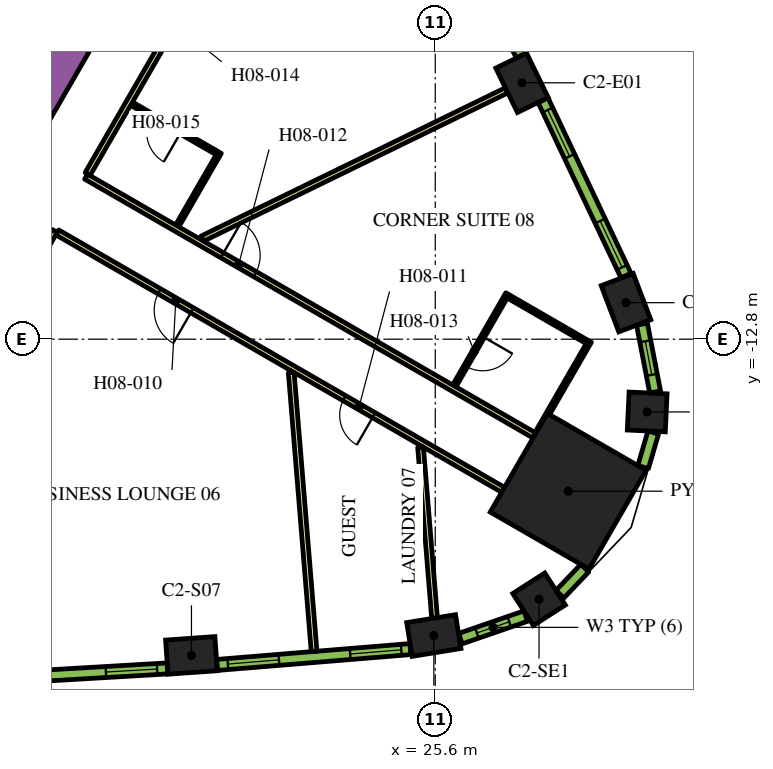
"""IFC4 building model, lengths in metres.
Left out: names, types, materials, properties, quantities, classifications, styles, units other than length and angle.
Written with IfcOpenShell. Run it as: python <this file> out.ifc"""

import sys

from ifc_helpers import new_model, si_unit, direction, frame, frame_2d, origin, origin_2d, place, context, subcontext, project, spatial, rectangle, extrude, element, fill, save


model = new_model("IFC4")
c1 = context("Model", 3, precision=1e-05, world=origin(), true_north=direction((0.0, 1.0)))
c2 = subcontext(c1, "Body", "Model", "MODEL_VIEW")
j1 = project(units=[si_unit("LENGTHUNIT", "METRE"), si_unit("PLANEANGLEUNIT", "RADIAN")], contexts=[c1])
p1 = place(None, origin())
s1 = spatial("IfcSite", under=j1, at=p1, CompositionType="ELEMENT")
p2 = place(p1, origin())
s2 = spatial("IfcBuilding", under=s1, at=p2, CompositionType="ELEMENT")
p3 = place(p2, frame((0.0, 0.0, 111.0)))
s3 = spatial("IfcBuildingStorey", under=s2, at=p3, CompositionType="ELEMENT", Elevation=111.0)
p4 = place(p3, frame((29.097, -16.799, 0.0), z_axis=(0.0, 0.0, 1.0), x_axis=(0.866025403784, -0.5, 0.0)))
e1 = element("IfcColumn", 1, at=p4, inside=s3, PredefinedType="COLUMN", context=c2, shape_type="SweptSolid", body=[
    extrude(rectangle(XDim=3.0, YDim=3.0, at=origin_2d()), origin(), (0.0, 0.0, 1.0), 3.9),
])
for number, where, z_axis, x_axis in (
    (2, (19.184, -21.12, 0.0), (0.0, 0.0, 1.0), (0.998, 0.07, 0.0)),
    (3, (25.563, -20.597, 0.0), (0.0, 0.0, 1.0), (0.987, 0.159, 0.0)),
):
    element("IfcColumn", number, at=place(p3, frame(where, z_axis=z_axis, x_axis=x_axis)), inside=s3, PredefinedType="COLUMN", context=c2, shape_type="SweptSolid", body=[
        extrude(rectangle(XDim=1.3, YDim=0.9, at=origin_2d()), origin(), (0.0, 0.0, 1.0), 3.9),
    ])
for number, where, z_axis, x_axis in (
    (4, (28.331, -19.643, 0.0), (0.0, 0.0, 1.0), (0.842, 0.54, 0.0)),
    (5, (31.177, -14.714, 0.0), (0.0, 0.0, 1.0), (0.047, 0.999, 0.0)),
):
    element("IfcColumn", number, at=place(p3, frame(where, z_axis=z_axis, x_axis=x_axis)), inside=s3, PredefinedType="COLUMN", context=c2, shape_type="SweptSolid", body=[
        extrude(rectangle(XDim=1.0, YDim=1.0, at=origin_2d()), origin(), (0.0, 0.0, 1.0), 3.9),
    ])
for number, where, z_axis, x_axis in (
    (6, (30.619, -11.839, 0.0), (0.0, 0.0, 1.0), (-0.355, 0.935, 0.0)),
    (7, (27.883, -6.054, 0.0), (0.0, 0.0, 1.0), (-0.438, 0.899, 0.0)),
):
    element("IfcColumn", number, at=place(p3, frame(where, z_axis=z_axis, x_axis=x_axis)), inside=s3, PredefinedType="COLUMN", context=c2, shape_type="SweptSolid", body=[
        extrude(rectangle(XDim=1.3, YDim=0.9, at=origin_2d()), origin(), (0.0, 0.0, 1.0), 3.9),
    ])
p5 = place(p3, frame((11.695, -12.644, 0.0), z_axis=(0.0, 0.0, 1.0), x_axis=(0.500010229568, 0.86601949766, 0.0)))
e8 = element("IfcWall", 8, at=p5, inside=s3, PredefinedType="SOLIDWALL", context=c2, shape_type="SweptSolid", body=[
    extrude(rectangle(XDim=9.326, YDim=0.9, at=frame_2d((4.663, 0.0))), origin(), (0.0, 0.0, 1.0), 3.9),
])
p6 = place(p3, frame((16.412, -8.523, 0.0), z_axis=(0.0, 0.0, 1.0), x_axis=(0.866025629663, -0.499999608766, 0.0)))
e9 = element("IfcWall", 9, at=p6, inside=s3, PredefinedType="PARTITIONING", context=c2, shape_type="SweptSolid", body=[
    extrude(rectangle(XDim=13.624, YDim=0.15, at=frame_2d((6.812, 0.0))), origin(), (0.0, 0.0, 1.0), 2.75),
])
p7 = place(p6, frame((4.134, 0.0, 0.0)))
e10 = element("IfcOpeningElement", 10, at=p7, cuts=e9, PredefinedType="OPENING", context=c2, shape_type="SweptSolid", body=[
    extrude(rectangle(XDim=1.0, YDim=2.1, at=frame_2d((0.5, 1.05))), frame((0.0, 0.085, 0.0), z_axis=(0.0, -1.0, 0.0), x_axis=(1.0, 0.0, 0.0)), (0.0, 0.0, 1.0), 0.17),
])
p8 = place(p3, frame((19.081, -3.9, 0.0), z_axis=(0.0, 0.0, 1.0), x_axis=(-0.499974327079, -0.866040225545, 0.0)))
e11 = element("IfcWall", 11, at=p8, inside=s3, PredefinedType="PARTITIONING", context=c2, shape_type="SweptSolid", body=[
    extrude(rectangle(XDim=5.258, YDim=0.15, at=frame_2d((2.629, 0.0))), origin(), (0.0, 0.0, 1.0), 2.75),
])
p9 = place(p8, frame((0.18, 0.0, 0.0)))
e12 = element("IfcOpeningElement", 12, at=p9, cuts=e11, PredefinedType="OPENING", context=c2, shape_type="SweptSolid", body=[
    extrude(rectangle(XDim=1.0, YDim=2.1, at=frame_2d((0.5, 1.05))), frame((0.0, 0.085, 0.0), z_axis=(0.0, -1.0, 0.0), x_axis=(1.0, 0.0, 0.0)), (0.0, 0.0, 1.0), 0.17),
])
p10 = place(p3, frame((15.587, -9.952, 0.0), z_axis=(0.0, 0.0, 1.0), x_axis=(-0.500016618951, -0.866015808616, 0.0)))
e13 = element("IfcWall", 13, at=p10, inside=s3, PredefinedType="PARTITIONING", context=c2, shape_type="SweptSolid", body=[
    extrude(rectangle(XDim=5.268, YDim=0.15, at=frame_2d((2.634, 0.0))), origin(), (0.0, 0.0, 1.0), 2.75),
])
p11 = place(p3, frame((27.386, -16.764, 0.0), z_axis=(0.0, 0.0, 1.0), x_axis=(-0.866022585856, 0.500004880763, 0.0)))
e14 = element("IfcWall", 14, at=p11, inside=s3, PredefinedType="PARTITIONING", context=c2, shape_type="SweptSolid", body=[
    extrude(rectangle(XDim=13.544, YDim=0.15, at=frame_2d((6.772, 0.0))), origin(), (0.0, 0.0, 1.0), 2.75),
])
p12 = place(p11, frame((9.447, 0.0, 0.0)))
e15 = element("IfcOpeningElement", 15, at=p12, cuts=e14, PredefinedType="OPENING", context=c2, shape_type="SweptSolid", body=[
    extrude(rectangle(XDim=1.0, YDim=2.1, at=frame_2d((0.5, 1.05))), frame((0.0, 0.085, 0.0), z_axis=(0.0, -1.0, 0.0), x_axis=(1.0, 0.0, 0.0)), (0.0, 0.0, 1.0), 0.17),
])
p13 = place(p11, frame((3.926, 0.0, 0.0)))
e16 = element("IfcOpeningElement", 16, at=p13, cuts=e14, PredefinedType="OPENING", context=c2, shape_type="SweptSolid", body=[
    extrude(rectangle(XDim=0.9, YDim=2.1, at=frame_2d((0.45, 1.05))), frame((0.0, 0.085, 0.0), z_axis=(0.0, -1.0, 0.0), x_axis=(1.0, 0.0, 0.0)), (0.0, 0.0, 1.0), 0.17),
])
p14 = place(p3, frame((27.478, -6.251, 0.0), z_axis=(0.0, 0.0, 1.0), x_axis=(-0.898940618603, -0.438070501432, 0.0)))
e17 = element("IfcWall", 17, at=p14, inside=s3, PredefinedType="PARTITIONING", context=c2, shape_type="SweptSolid", body=[
    extrude(rectangle(XDim=8.909, YDim=0.15, at=frame_2d((4.455, 0.0))), origin(), (0.0, 0.0, 1.0), 2.75),
])
p15 = place(p3, frame((22.412, -21.016, 0.0), z_axis=(0.0, 0.0, 1.0), x_axis=(-0.081744540534, 0.996653314896, 0.0)))
e18 = element("IfcWall", 18, at=p15, inside=s3, PredefinedType="PARTITIONING", context=c2, shape_type="SweptSolid", body=[
    extrude(rectangle(XDim=7.362, YDim=0.15, at=frame_2d((3.681, 0.0))), origin(), (0.0, 0.0, 1.0), 2.75),
])
p16 = place(p3, frame((25.582, -20.138, 0.0), z_axis=(0.0, 0.0, 1.0), x_axis=(-0.081746132986, 0.996653184283, 0.0)))
e19 = element("IfcWall", 19, at=p16, inside=s3, PredefinedType="PARTITIONING", context=c2, shape_type="SweptSolid", body=[
    extrude(rectangle(XDim=4.51, YDim=0.15, at=frame_2d((2.255, 0.0))), origin(), (0.0, 0.0, 1.0), 2.75),
])
p17 = place(p3, frame((27.5, -11.605, 0.0), z_axis=(0.0, 0.0, 1.0), x_axis=(-0.500049511043, -0.865996816683, 0.0)))
e20 = element("IfcWall", 20, at=p17, inside=s3, PredefinedType="PARTITIONING", context=c2, shape_type="SweptSolid", body=[
    extrude(rectangle(XDim=2.8, YDim=0.1, at=frame_2d((1.4, 0.0))), origin(), (0.0, 0.0, 1.0), 2.75),
])
p18 = place(p17, frame((1.3, 0.0, 0.0)))
e21 = element("IfcOpeningElement", 21, at=p18, cuts=e20, PredefinedType="OPENING", context=c2, shape_type="SweptSolid", body=[
    extrude(rectangle(XDim=0.9, YDim=2.1, at=frame_2d((0.45, 1.05))), frame((0.0, 0.06, 0.0), z_axis=(0.0, -1.0, 0.0), x_axis=(1.0, 0.0, 0.0)), (0.0, 0.0, 1.0), 0.12),
])
p19 = place(p3, frame((27.519, -11.673, 0.0), z_axis=(0.0, 0.0, 1.0), x_axis=(0.866024647952, -0.500001309137, 0.0)))
e22 = element("IfcWall", 22, at=p19, inside=s3, PredefinedType="PARTITIONING", context=c2, shape_type="SweptSolid", body=[
    extrude(rectangle(XDim=2.4, YDim=0.1, at=frame_2d((1.2, 0.0))), origin(), (0.0, 0.0, 1.0), 2.75),
])
p20 = place(p3, frame((28.265, -15.28, 0.0), z_axis=(0.0, 0.0, 1.0), x_axis=(0.500049511043, 0.865996816683, 0.0)))
e23 = element("IfcWall", 23, at=p20, inside=s3, PredefinedType="PARTITIONING", context=c2, shape_type="SweptSolid", body=[
    extrude(rectangle(XDim=2.8, YDim=0.1, at=frame_2d((1.4, 0.0))), origin(), (0.0, 0.0, 1.0), 2.75),
])
p21 = place(p3, frame((19.946, -7.953, 0.0), z_axis=(0.0, 0.0, 1.0), x_axis=(-0.86599734893, 0.500048589285, 0.0)))
e24 = element("IfcWall", 24, at=p21, inside=s3, PredefinedType="PARTITIONING", context=c2, shape_type="SweptSolid", body=[
    extrude(rectangle(XDim=2.7, YDim=0.1, at=frame_2d((1.35, 0.0))), origin(), (0.0, 0.0, 1.0), 2.75),
])
p22 = place(p21, frame((1.2, 0.0, 0.0)))
e25 = element("IfcOpeningElement", 25, at=p22, cuts=e24, PredefinedType="OPENING", context=c2, shape_type="SweptSolid", body=[
    extrude(rectangle(XDim=0.9, YDim=2.1, at=frame_2d((0.45, 1.05))), frame((0.0, 0.06, 0.0), z_axis=(0.0, -1.0, 0.0), x_axis=(1.0, 0.0, 0.0)), (0.0, 0.0, 1.0), 0.12),
])
p23 = place(p3, frame((19.877, -7.972, 0.0), z_axis=(0.0, 0.0, 1.0), x_axis=(-0.500010206181, -0.866019511163, 0.0)))
e26 = element("IfcWall", 26, at=p23, inside=s3, PredefinedType="PARTITIONING", context=c2, shape_type="SweptSolid", body=[
    extrude(rectangle(XDim=2.13, YDim=0.1, at=frame_2d((1.065, 0.0))), origin(), (0.0, 0.0, 1.0), 2.75),
])
p24 = place(p3, frame((13.462, -21.761, 0.0), z_axis=(0.0, 0.0, 1.0), x_axis=(0.998290511436, 0.058447025388, 0.0)))
e27 = element("IfcWall", 27, at=p24, inside=s3, PredefinedType="SOLIDWALL", context=c2, shape_type="SweptSolid", body=[
    extrude(rectangle(XDim=5.1, YDim=0.29, at=frame_2d((2.55, 0.0))), origin(), (0.0, 0.0, 1.0), 3.65),
])
p25 = place(p24, frame((0.272, 0.0, 0.9)))
e28 = element("IfcOpeningElement", 28, at=p25, cuts=e27, PredefinedType="OPENING", context=c2, shape_type="SweptSolid", body=[
    extrude(rectangle(XDim=1.35, YDim=2.15, at=frame_2d((0.675, 1.075))), frame((0.0, 0.155, 0.0), z_axis=(0.0, -1.0, 0.0), x_axis=(1.0, 0.0, 0.0)), (0.0, 0.0, 1.0), 0.31),
])
p26 = place(p24, frame((3.478, 0.0, 0.9)))
e29 = element("IfcOpeningElement", 29, at=p26, cuts=e27, PredefinedType="OPENING", context=c2, shape_type="SweptSolid", body=[
    extrude(rectangle(XDim=1.35, YDim=2.15, at=frame_2d((0.675, 1.075))), frame((0.0, 0.155, 0.0), z_axis=(0.0, -1.0, 0.0), x_axis=(1.0, 0.0, 0.0)), (0.0, 0.0, 1.0), 0.31),
])
p27 = place(p3, frame((19.857, -21.371, 0.0), z_axis=(0.0, 0.0, 1.0), x_axis=(0.99665273362, 0.081751627308, 0.0)))
e30 = element("IfcWall", 30, at=p27, inside=s3, PredefinedType="SOLIDWALL", context=c2, shape_type="SweptSolid", body=[
    extrude(rectangle(XDim=5.107, YDim=0.29, at=frame_2d((2.553, 0.0))), origin(), (0.0, 0.0, 1.0), 3.65),
])
p28 = place(p27, frame((0.285, 0.0, 0.9)))
e31 = element("IfcOpeningElement", 31, at=p28, cuts=e30, PredefinedType="OPENING", context=c2, shape_type="SweptSolid", body=[
    extrude(rectangle(XDim=1.35, YDim=2.15, at=frame_2d((0.675, 1.075))), frame((0.0, 0.155, 0.0), z_axis=(0.0, -1.0, 0.0), x_axis=(1.0, 0.0, 0.0)), (0.0, 0.0, 1.0), 0.31),
])
p29 = place(p27, frame((3.516, 0.0, 0.9)))
e32 = element("IfcOpeningElement", 32, at=p29, cuts=e30, PredefinedType="OPENING", context=c2, shape_type="SweptSolid", body=[
    extrude(rectangle(XDim=1.35, YDim=2.15, at=frame_2d((0.675, 1.075))), frame((0.0, 0.155, 0.0), z_axis=(0.0, -1.0, 0.0), x_axis=(1.0, 0.0, 0.0)), (0.0, 0.0, 1.0), 0.31),
])
p30 = place(p3, frame((26.261, -20.679, 0.0), z_axis=(0.0, 0.0, 1.0), x_axis=(0.945385815453, 0.325953462844, 0.0)))
e33 = element("IfcWall", 33, at=p30, inside=s3, PredefinedType="SOLIDWALL", context=c2, shape_type="SweptSolid", body=[
    extrude(rectangle(XDim=1.819, YDim=0.29, at=frame_2d((0.91, 0.0))), origin(), (0.0, 0.0, 1.0), 3.65),
])
p31 = place(p30, frame((0.46, 0.0, 0.9)))
e34 = element("IfcOpeningElement", 34, at=p31, cuts=e33, PredefinedType="OPENING", context=c2, shape_type="SweptSolid", body=[
    extrude(rectangle(XDim=0.9, YDim=2.15, at=frame_2d((0.45, 1.075))), frame((0.0, 0.155, 0.0), z_axis=(0.0, -1.0, 0.0), x_axis=(1.0, 0.0, 0.0)), (0.0, 0.0, 1.0), 0.31),
])
p32 = place(p3, frame((28.88, -19.509, 0.0), z_axis=(0.0, 0.0, 1.0), x_axis=(0.690414427296, 0.723414071319, 0.0)))
e35 = element("IfcWall", 35, at=p32, inside=s3, PredefinedType="SOLIDWALL", context=c2, shape_type="SweptSolid", body=[
    extrude(rectangle(XDim=0.947, YDim=0.29, at=frame_2d((0.474, 0.0))), origin(), (0.0, 0.0, 1.0), 3.65),
])
p33 = place(p3, frame((31.069, -16.165, 0.0), z_axis=(0.0, 0.0, 1.0), x_axis=(0.281454582132, 0.95957455062, 0.0)))
e36 = element("IfcWall", 36, at=p33, inside=s3, PredefinedType="SOLIDWALL", context=c2, shape_type="SweptSolid", body=[
    extrude(rectangle(XDim=0.947, YDim=0.29, at=frame_2d((0.474, 0.0))), origin(), (0.0, 0.0, 1.0), 3.65),
])
p34 = place(p3, frame((31.385, -14.189, 0.0), z_axis=(0.0, 0.0, 1.0), x_axis=(-0.190409913989, 0.981704672829, 0.0)))
e37 = element("IfcWall", 37, at=p34, inside=s3, PredefinedType="SOLIDWALL", context=c2, shape_type="SweptSolid", body=[
    extrude(rectangle(XDim=1.819, YDim=0.29, at=frame_2d((0.91, 0.0))), origin(), (0.0, 0.0, 1.0), 3.65),
])
p35 = place(p34, frame((0.46, 0.0, 0.9)))
e38 = element("IfcOpeningElement", 38, at=p35, cuts=e37, PredefinedType="OPENING", context=c2, shape_type="SweptSolid", body=[
    extrude(rectangle(XDim=0.9, YDim=2.15, at=frame_2d((0.45, 1.075))), frame((0.0, 0.155, 0.0), z_axis=(0.0, -1.0, 0.0), x_axis=(1.0, 0.0, 0.0)), (0.0, 0.0, 1.0), 0.31),
])
p36 = place(p3, frame((30.62, -11.127, 0.0), z_axis=(0.0, 0.0, 1.0), x_axis=(-0.427543726596, 0.903994669148, 0.0)))
e39 = element("IfcWall", 39, at=p36, inside=s3, PredefinedType="SOLIDWALL", context=c2, shape_type="SweptSolid", body=[
    extrude(rectangle(XDim=5.107, YDim=0.29, at=frame_2d((2.553, 0.0))), origin(), (0.0, 0.0, 1.0), 3.65),
])
p37 = place(p36, frame((0.24, 0.0, 0.9)))
e40 = element("IfcOpeningElement", 40, at=p37, cuts=e39, PredefinedType="OPENING", context=c2, shape_type="SweptSolid", body=[
    extrude(rectangle(XDim=1.35, YDim=2.15, at=frame_2d((0.675, 1.075))), frame((0.0, 0.155, 0.0), z_axis=(0.0, -1.0, 0.0), x_axis=(1.0, 0.0, 0.0)), (0.0, 0.0, 1.0), 0.31),
])
p38 = place(p36, frame((3.471, 0.0, 0.9)))
e41 = element("IfcOpeningElement", 41, at=p38, cuts=e39, PredefinedType="OPENING", context=c2, shape_type="SweptSolid", body=[
    extrude(rectangle(XDim=1.35, YDim=2.15, at=frame_2d((0.675, 1.075))), frame((0.0, 0.155, 0.0), z_axis=(0.0, -1.0, 0.0), x_axis=(1.0, 0.0, 0.0)), (0.0, 0.0, 1.0), 0.31),
])
p39 = place(p3, frame((27.864, -5.336, 0.0), z_axis=(0.0, 0.0, 1.0), x_axis=(-0.448534297211, 0.893765620409, 0.0)))
e42 = element("IfcWall", 42, at=p39, inside=s3, PredefinedType="SOLIDWALL", context=c2, shape_type="SweptSolid", body=[
    extrude(rectangle(XDim=5.1, YDim=0.29, at=frame_2d((2.55, 0.0))), origin(), (0.0, 0.0, 1.0), 3.65),
])
p40 = place(p39, frame((0.272, 0.0, 0.9)))
e43 = element("IfcOpeningElement", 43, at=p40, cuts=e42, PredefinedType="OPENING", context=c2, shape_type="SweptSolid", body=[
    extrude(rectangle(XDim=1.35, YDim=2.15, at=frame_2d((0.675, 1.075))), frame((0.0, 0.155, 0.0), z_axis=(0.0, -1.0, 0.0), x_axis=(1.0, 0.0, 0.0)), (0.0, 0.0, 1.0), 0.31),
])
p41 = place(p39, frame((3.478, 0.0, 0.9)))
e44 = element("IfcOpeningElement", 44, at=p41, cuts=e42, PredefinedType="OPENING", context=c2, shape_type="SweptSolid", body=[
    extrude(rectangle(XDim=1.35, YDim=2.15, at=frame_2d((0.675, 1.075))), frame((0.0, 0.155, 0.0), z_axis=(0.0, -1.0, 0.0), x_axis=(1.0, 0.0, 0.0)), (0.0, 0.0, 1.0), 0.31),
])
p42 = place(p12, origin())
e45 = element("IfcDoor", 45, at=p42, inside=s3, OperationType="SINGLE_SWING_RIGHT", PredefinedType="DOOR", context=c2, shape_type="SweptSolid", body=[
    extrude(rectangle(XDim=1.0, YDim=2.1, at=frame_2d((0.5, 1.05))), frame((0.0, 0.025, 0.0), z_axis=(0.0, -1.0, 0.0), x_axis=(1.0, 0.0, 0.0)), (0.0, 0.0, 1.0), 0.05),
])
fill(e15, e45)
p43 = place(p13, origin())
e46 = element("IfcDoor", 46, at=p43, inside=s3, OperationType="SINGLE_SWING_LEFT", PredefinedType="DOOR", context=c2, shape_type="SweptSolid", body=[
    extrude(rectangle(XDim=0.9, YDim=2.1, at=frame_2d((0.45, 1.05))), frame((0.0, 0.025, 0.0), z_axis=(0.0, -1.0, 0.0), x_axis=(1.0, 0.0, 0.0)), (0.0, 0.0, 1.0), 0.05),
])
fill(e16, e46)
p44 = place(p7, origin())
e47 = element("IfcDoor", 47, at=p44, inside=s3, OperationType="SINGLE_SWING_LEFT", PredefinedType="DOOR", context=c2, shape_type="SweptSolid", body=[
    extrude(rectangle(XDim=1.0, YDim=2.1, at=frame_2d((0.5, 1.05))), frame((0.0, 0.025, 0.0), z_axis=(0.0, -1.0, 0.0), x_axis=(1.0, 0.0, 0.0)), (0.0, 0.0, 1.0), 0.05),
])
fill(e10, e47)
p45 = place(p18, origin())
e48 = element("IfcDoor", 48, at=p45, inside=s3, OperationType="SINGLE_SWING_LEFT", PredefinedType="DOOR", context=c2, shape_type="SweptSolid", body=[
    extrude(rectangle(XDim=0.9, YDim=2.1, at=frame_2d((0.45, 1.05))), frame((0.0, 0.025, 0.0), z_axis=(0.0, -1.0, 0.0), x_axis=(1.0, 0.0, 0.0)), (0.0, 0.0, 1.0), 0.05),
])
fill(e21, e48)
p46 = place(p22, origin())
e49 = element("IfcDoor", 49, at=p46, inside=s3, OperationType="SINGLE_SWING_RIGHT", PredefinedType="DOOR", context=c2, shape_type="SweptSolid", body=[
    extrude(rectangle(XDim=0.9, YDim=2.1, at=frame_2d((0.45, 1.05))), frame((0.0, 0.025, 0.0), z_axis=(0.0, -1.0, 0.0), x_axis=(1.0, 0.0, 0.0)), (0.0, 0.0, 1.0), 0.05),
])
fill(e25, e49)
p47 = place(p26, origin())
e50 = element("IfcWindow", 50, at=p47, inside=s3, PartitioningType="DOUBLE_PANEL_VERTICAL", PredefinedType="WINDOW", context=c2, shape_type="SweptSolid", body=[
    extrude(rectangle(XDim=1.35, YDim=2.15, at=frame_2d((0.675, 1.075))), frame((0.0, 0.015, 0.0), z_axis=(0.0, -1.0, 0.0), x_axis=(1.0, 0.0, 0.0)), (0.0, 0.0, 1.0), 0.06),
])
fill(e29, e50)
p48 = place(p28, origin())
e51 = element("IfcWindow", 51, at=p48, inside=s3, PartitioningType="DOUBLE_PANEL_VERTICAL", PredefinedType="WINDOW", context=c2, shape_type="SweptSolid", body=[
    extrude(rectangle(XDim=1.35, YDim=2.15, at=frame_2d((0.675, 1.075))), frame((0.0, 0.015, 0.0), z_axis=(0.0, -1.0, 0.0), x_axis=(1.0, 0.0, 0.0)), (0.0, 0.0, 1.0), 0.06),
])
fill(e31, e51)
p49 = place(p29, origin())
e52 = element("IfcWindow", 52, at=p49, inside=s3, PartitioningType="DOUBLE_PANEL_VERTICAL", PredefinedType="WINDOW", context=c2, shape_type="SweptSolid", body=[
    extrude(rectangle(XDim=1.35, YDim=2.15, at=frame_2d((0.675, 1.075))), frame((0.0, 0.015, 0.0), z_axis=(0.0, -1.0, 0.0), x_axis=(1.0, 0.0, 0.0)), (0.0, 0.0, 1.0), 0.06),
])
fill(e32, e52)
p50 = place(p31, origin())
e53 = element("IfcWindow", 53, at=p50, inside=s3, PartitioningType="SINGLE_PANEL", PredefinedType="WINDOW", context=c2, shape_type="SweptSolid", body=[
    extrude(rectangle(XDim=0.9, YDim=2.15, at=frame_2d((0.45, 1.075))), frame((0.0, 0.015, 0.0), z_axis=(0.0, -1.0, 0.0), x_axis=(1.0, 0.0, 0.0)), (0.0, 0.0, 1.0), 0.06),
])
fill(e34, e53)
p51 = place(p35, origin())
e54 = element("IfcWindow", 54, at=p51, inside=s3, PartitioningType="SINGLE_PANEL", PredefinedType="WINDOW", context=c2, shape_type="SweptSolid", body=[
    extrude(rectangle(XDim=0.9, YDim=2.15, at=frame_2d((0.45, 1.075))), frame((0.0, 0.015, 0.0), z_axis=(0.0, -1.0, 0.0), x_axis=(1.0, 0.0, 0.0)), (0.0, 0.0, 1.0), 0.06),
])
fill(e38, e54)
p52 = place(p37, origin())
e55 = element("IfcWindow", 55, at=p52, inside=s3, PartitioningType="DOUBLE_PANEL_VERTICAL", PredefinedType="WINDOW", context=c2, shape_type="SweptSolid", body=[
    extrude(rectangle(XDim=1.35, YDim=2.15, at=frame_2d((0.675, 1.075))), frame((0.0, 0.015, 0.0), z_axis=(0.0, -1.0, 0.0), x_axis=(1.0, 0.0, 0.0)), (0.0, 0.0, 1.0), 0.06),
])
fill(e40, e55)
p53 = place(p38, origin())
e56 = element("IfcWindow", 56, at=p53, inside=s3, PartitioningType="DOUBLE_PANEL_VERTICAL", PredefinedType="WINDOW", context=c2, shape_type="SweptSolid", body=[
    extrude(rectangle(XDim=1.35, YDim=2.15, at=frame_2d((0.675, 1.075))), frame((0.0, 0.015, 0.0), z_axis=(0.0, -1.0, 0.0), x_axis=(1.0, 0.0, 0.0)), (0.0, 0.0, 1.0), 0.06),
])
fill(e41, e56)
save(model, sys.argv[1])
